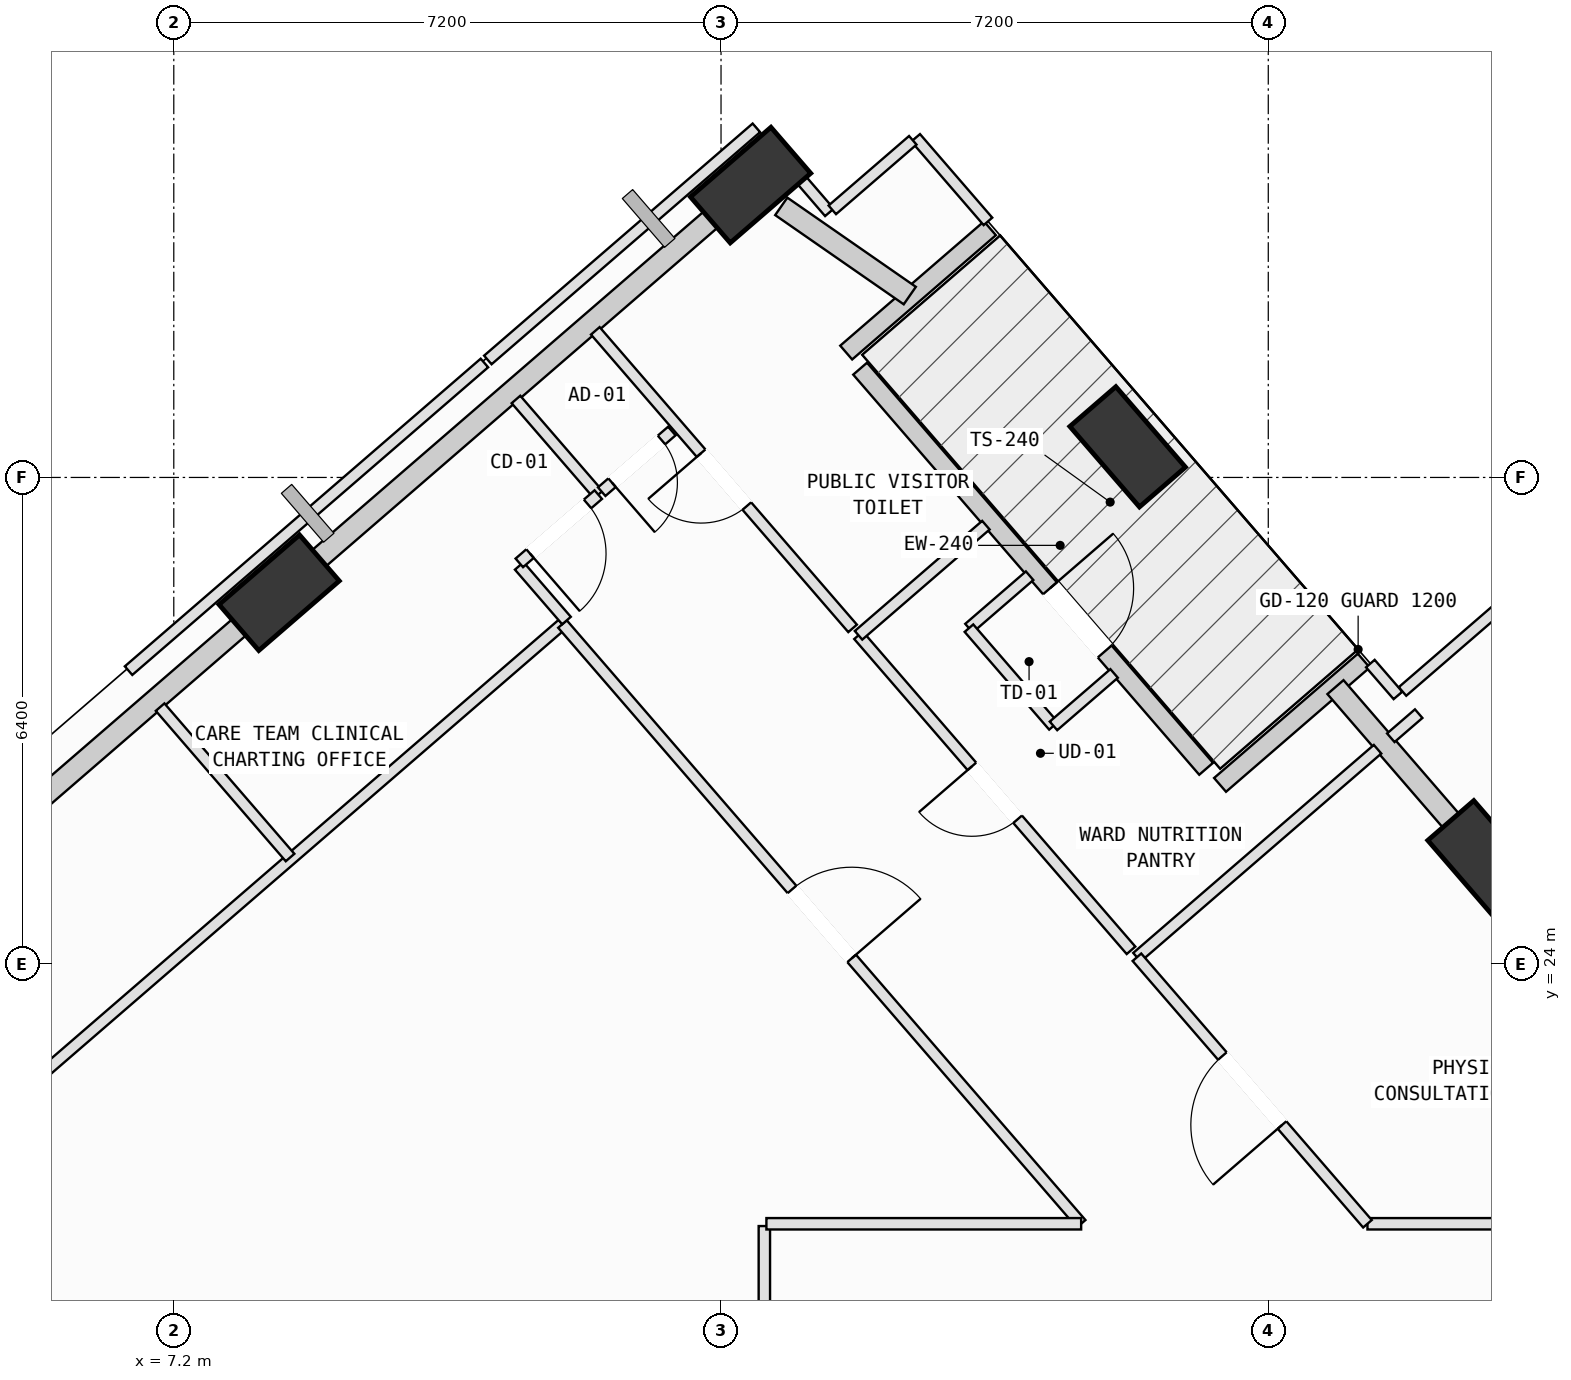
"""IFC4 building model, lengths in metres.
Left out: names, types, materials, properties, quantities, classifications, styles, units other than length and angle.
Written with IfcOpenShell. Run it as: python <this file> out.ifc"""

import sys

from ifc_helpers import new_model, si_unit, direction, frame, frame_2d, origin, origin_2d, place, context, subcontext, project, spatial, rectangle, extrude, element, fill, save


model = new_model("IFC4")
c1 = context("Model", 3, precision=1e-05, world=origin(), true_north=direction((0.0, 1.0)))
c2 = subcontext(c1, "Body", "Model", "MODEL_VIEW")
j1 = project(units=[si_unit("LENGTHUNIT", "METRE"), si_unit("PLANEANGLEUNIT", "RADIAN")], contexts=[c1])
p1 = place(None, origin())
s1 = spatial("IfcSite", under=j1, at=p1, CompositionType="ELEMENT")
p2 = place(p1, origin())
s2 = spatial("IfcBuilding", under=s1, at=p2, CompositionType="ELEMENT")
p3 = place(p2, frame((0.0, 0.0, 197.8)))
s3 = spatial("IfcBuildingStorey", under=s2, at=p3, CompositionType="ELEMENT", Elevation=197.8)
p4 = place(p3, frame((24.459, 25.357, 0.002), z_axis=(-0.001953505753, -0.03791022102, 0.999279239731), x_axis=(-0.614315591928, 0.788537788742, 0.028714268915)))
e1 = element("IfcColumn", 1, at=p4, inside=s3, PredefinedType="COLUMN", context=c2, shape_type="SweptSolid", body=[
    extrude(rectangle(XDim=1.4, YDim=0.8, at=origin_2d()), origin(), (0.0, 0.0, 1.0), 3.999),
])
p5 = place(p3, frame((19.75, 30.803, 0.002), z_axis=(-0.024327793483, -0.057496514422, 0.998049251938), x_axis=(-0.30819596819, 0.95015002601, 0.047224710319)))
e2 = element("IfcColumn", 2, at=p5, inside=s3, PredefinedType="COLUMN", context=c2, shape_type="SweptSolid", body=[
    extrude(rectangle(XDim=1.4, YDim=0.8, at=origin_2d()), origin(), (0.0, 0.0, 1.0), 4.004),
])
p6 = place(p3, frame((14.789, 34.247, 0.002), z_axis=(-0.038341673554, -0.078022262692, 0.996214054605), x_axis=(0.96626592112, 0.251190925626, 0.056862013376)))
e3 = element("IfcColumn", 3, at=p6, inside=s3, PredefinedType="COLUMN", context=c2, shape_type="SweptSolid", body=[
    extrude(rectangle(XDim=1.4, YDim=0.8, at=origin_2d()), origin(), (0.0, 0.0, 1.0), 4.011),
])
p7 = place(p3, frame((8.586, 28.884, 0.002), z_axis=(-0.015978962471, -0.103286069202, 0.994523333395), x_axis=(0.846984642611, 0.527203728551, 0.068361127714)))
e4 = element("IfcColumn", 4, at=p7, inside=s3, PredefinedType="COLUMN", context=c2, shape_type="SweptSolid", body=[
    extrude(rectangle(XDim=1.4, YDim=0.8, at=origin_2d()), origin(), (0.0, 0.0, 1.0), 4.018),
])
p8 = place(p3, frame((16.23, 31.831, 0.0), z_axis=(0.0, 0.0, 1.0), x_axis=(0.654092813451, -0.756414298775, 0.0)))
e5 = element("IfcWall", 5, at=p8, inside=s3, PredefinedType="SOLIDWALL", context=c2, shape_type="SweptSolid", body=[
    extrude(rectangle(XDim=6.96, YDim=0.24, at=frame_2d((3.48, 0.0))), origin(), (0.0, 0.0, 1.0), 3.265),
])
p9 = place(p8, frame((3.82, 0.0, 0.0)))
e6 = element("IfcOpeningElement", 6, at=p9, cuts=e5, PredefinedType="OPENING", context=c2, shape_type="SweptSolid", body=[
    extrude(rectangle(XDim=1.1, YDim=2.15, at=frame_2d((0.55, 1.075))), frame((0.0, 0.13, 0.0), z_axis=(0.0, -1.0, 0.0), x_axis=(1.0, 0.0, 0.0)), (0.0, 0.0, 1.0), 0.26),
])
for number, where, z_axis, x_axis in (
    (7, (20.966, 26.355, 0.0), (0.0, 0.0, 1.0), (0.756, 0.654, 0.0)),
    (8, (17.938, 33.678, 0.0), (0.0, 0.0, 1.0), (-0.756, -0.654, 0.0)),
):
    element("IfcWall", number, at=place(p3, frame(where, z_axis=z_axis, x_axis=x_axis)), inside=s3, PredefinedType="SOLIDWALL", context=c2, shape_type="SweptSolid", body=[
        extrude(rectangle(XDim=2.5, YDim=0.24, at=frame_2d((1.25, 0.0))), origin(), (0.0, 0.0, 1.0), 3.265),
    ])
p10 = place(p3, frame((24.172, 25.689, 0.0), z_axis=(0.0, 0.0, 1.0), x_axis=(-0.654087588851, 0.756418816603, 0.0)))
e9 = element("IfcWall", 9, at=p10, inside=s3, PredefinedType="SOLIDWALL", context=c2, shape_type="SweptSolid", body=[
    extrude(rectangle(XDim=2.582, YDim=0.28, at=frame_2d((1.291, 0.0))), origin(), (0.0, 0.0, 1.0), 3.245),
])
p11 = place(p3, frame((15.192, 33.967, 0.0), z_axis=(0.0, 0.0, 1.0), x_axis=(0.821504218331, -0.570202437092, 0.0)))
e10 = element("IfcWall", 10, at=p11, inside=s3, PredefinedType="SOLIDWALL", context=c2, shape_type="SweptSolid", body=[
    extrude(rectangle(XDim=2.059, YDim=0.28, at=frame_2d((1.029, 0.0))), origin(), (0.0, 0.0, 1.0), 3.245),
])
p12 = place(p3, frame((8.826, 29.091, 0.0), z_axis=(0.0, 0.0, 1.0), x_axis=(0.756422768402, 0.654083018769, 0.0)))
e11 = element("IfcWall", 11, at=p12, inside=s3, PredefinedType="SOLIDWALL", context=c2, shape_type="SweptSolid", body=[
    extrude(rectangle(XDim=7.231, YDim=0.28, at=frame_2d((3.615, 0.0))), origin(), (0.0, 0.0, 1.0), 3.265),
])
p13 = place(p3, frame((2.605, 23.712, 0.0), z_axis=(0.0, 0.0, 1.0), x_axis=(0.756416610338, 0.654090140275, 0.0)))
e12 = element("IfcWall", 12, at=p13, inside=s3, PredefinedType="SOLIDWALL", context=c2, shape_type="SweptSolid", body=[
    extrude(rectangle(XDim=7.27, YDim=0.28, at=frame_2d((3.635, 0.0))), origin(), (0.0, 0.0, 1.0), 3.265),
])
p14 = place(p3, frame((14.97, 20.55, 0.0), z_axis=(0.0, 0.0, 1.0), x_axis=(0.0, -1.0, 0.0)))
e13 = element("IfcWall", 13, at=p14, inside=s3, PredefinedType="PARTITIONING", context=c2, shape_type="SweptSolid", body=[
    extrude(rectangle(XDim=2.32, YDim=0.15, at=frame_2d((1.16, 0.0))), origin(), (0.0, 0.0, 1.0), 3.78),
])
p15 = place(p3, frame((2.82, 20.262, 0.0), z_axis=(0.0, 0.0, 1.0), x_axis=(0.756440163384, 0.654062901577, 0.0)))
e14 = element("IfcWall", 14, at=p15, inside=s3, PredefinedType="PARTITIONING", context=c2, shape_type="SweptSolid", body=[
    extrude(rectangle(XDim=12.551, YDim=0.15, at=frame_2d((6.275, 0.0))), origin(), (0.0, 0.0, 1.0), 3.78),
])
p16 = place(p3, frame((12.314, 28.471, 0.0), z_axis=(0.0, 0.0, 1.0), x_axis=(0.654121175756, -0.756389772159, 0.0)))
e15 = element("IfcWall", 15, at=p16, inside=s3, PredefinedType="PARTITIONING", context=c2, shape_type="SweptSolid", body=[
    extrude(rectangle(XDim=10.432, YDim=0.15, at=frame_2d((5.216, 0.0))), origin(), (0.0, 0.0, 1.0), 3.78),
])
p17 = place(p16, frame((4.616, 0.0, 0.0)))
e16 = element("IfcOpeningElement", 16, at=p17, cuts=e15, PredefinedType="OPENING", context=c2, shape_type="SweptSolid", body=[
    extrude(rectangle(XDim=1.2, YDim=2.15, at=frame_2d((0.6, 1.075))), frame((0.0, 0.085, 0.0), z_axis=(0.0, -1.0, 0.0), x_axis=(1.0, 0.0, 0.0)), (0.0, 0.0, 1.0), 0.17),
])
p18 = place(p3, frame((19.138, 20.58, 0.0), z_axis=(0.0, 0.0, 1.0), x_axis=(-1.0, 0.0, 0.0)))
e17 = element("IfcWall", 17, at=p18, inside=s3, PredefinedType="PARTITIONING", context=c2, shape_type="SweptSolid", body=[
    extrude(rectangle(XDim=4.141, YDim=0.15, at=frame_2d((2.07, 0.0))), origin(), (0.0, 0.0, 1.0), 3.78),
])
p19 = place(p3, frame((19.872, 24.087, 0.0), z_axis=(0.0, 0.0, 1.0), x_axis=(0.756494990974, 0.653999486721, 0.0)))
e18 = element("IfcWall", 18, at=p19, inside=s3, PredefinedType="PARTITIONING", context=c2, shape_type="SweptSolid", body=[
    extrude(rectangle(XDim=4.185, YDim=0.15, at=frame_2d((2.093, 0.0))), origin(), (0.0, 0.0, 1.0), 3.78),
])
p20 = place(p3, frame((23.212, 26.975, 0.0), z_axis=(0.0, 0.0, 1.0), x_axis=(0.75704932423, 0.653357727959, 0.0)))
e19 = element("IfcWall", 19, at=p20, inside=s3, PredefinedType="PARTITIONING", context=c2, shape_type="SweptSolid", body=[
    extrude(rectangle(XDim=0.485, YDim=0.15, at=frame_2d((0.243, 0.0))), origin(), (0.0, 0.0, 1.0), 3.78),
])
p21 = place(p3, frame((25.264, 20.58, 0.0), z_axis=(0.0, 0.0, 1.0), x_axis=(-1.0, 0.0, 0.0)))
e20 = element("IfcWall", 20, at=p21, inside=s3, PredefinedType="PARTITIONING", context=c2, shape_type="SweptSolid", body=[
    extrude(rectangle(XDim=2.359, YDim=0.15, at=frame_2d((1.179, 0.0))), origin(), (0.0, 0.0, 1.0), 3.78),
])
p22 = place(p3, frame((22.905, 20.58, 0.0), z_axis=(0.0, 0.0, 1.0), x_axis=(-0.654154375425, 0.756361060018, 0.0)))
e21 = element("IfcWall", 21, at=p22, inside=s3, PredefinedType="PARTITIONING", context=c2, shape_type="SweptSolid", body=[
    extrude(rectangle(XDim=4.636, YDim=0.15, at=frame_2d((2.318, 0.0))), origin(), (0.0, 0.0, 1.0), 3.78),
])
p23 = place(p22, frame((1.718, 0.0, 0.0)))
e22 = element("IfcOpeningElement", 22, at=p23, cuts=e21, PredefinedType="OPENING", context=c2, shape_type="SweptSolid", body=[
    extrude(rectangle(XDim=1.2, YDim=2.15, at=frame_2d((0.6, 1.075))), frame((0.0, 0.085, 0.0), z_axis=(0.0, -1.0, 0.0), x_axis=(1.0, 0.0, 0.0)), (0.0, 0.0, 1.0), 0.17),
])
p24 = place(p3, frame((19.794, 24.178, 0.0), z_axis=(0.0, 0.0, 1.0), x_axis=(-0.6541601986, 0.756356023687, 0.0)))
e23 = element("IfcWall", 23, at=p24, inside=s3, PredefinedType="PARTITIONING", context=c2, shape_type="SweptSolid", body=[
    extrude(rectangle(XDim=5.48, YDim=0.15, at=frame_2d((2.74, 0.0))), origin(), (0.0, 0.0, 1.0), 3.78),
])
p25 = place(p24, frame((2.28, 0.0, 0.0)))
e24 = element("IfcOpeningElement", 24, at=p25, cuts=e23, PredefinedType="OPENING", context=c2, shape_type="SweptSolid", body=[
    extrude(rectangle(XDim=0.92, YDim=2.1, at=frame_2d((0.46, 1.05))), frame((0.0, 0.085, 0.0), z_axis=(0.0, -1.0, 0.0), x_axis=(1.0, 0.0, 0.0)), (0.0, 0.0, 1.0), 0.17),
])
p26 = place(p3, frame((16.209, 28.323, 0.0), z_axis=(0.0, 0.0, 1.0), x_axis=(0.756488411531, 0.654007097223, 0.0)))
e25 = element("IfcWall", 25, at=p26, inside=s3, PredefinedType="PARTITIONING", context=c2, shape_type="SweptSolid", body=[
    extrude(rectangle(XDim=2.216, YDim=0.15, at=frame_2d((1.108, 0.0))), origin(), (0.0, 0.0, 1.0), 3.78),
])
p27 = place(p3, frame((18.46, 29.107, 0.0), z_axis=(0.0, 0.0, 1.0), x_axis=(-0.756406502771, -0.654101828896, 0.0)))
e26 = element("IfcWall", 26, at=p27, inside=s3, PredefinedType="PARTITIONING", context=c2, shape_type="SweptSolid", body=[
    extrude(rectangle(XDim=1.055, YDim=0.15, at=frame_2d((0.527, 0.0))), origin(), (0.0, 0.0, 1.0), 3.78),
])
p28 = place(p3, frame((17.662, 28.417, 0.0), z_axis=(0.0, 0.0, 1.0), x_axis=(0.654049777845, -0.75645151074, 0.0)))
e27 = element("IfcWall", 27, at=p28, inside=s3, PredefinedType="PARTITIONING", context=c2, shape_type="SweptSolid", body=[
    extrude(rectangle(XDim=1.7, YDim=0.15, at=frame_2d((0.85, 0.0))), origin(), (0.0, 0.0, 1.0), 3.78),
])
p29 = place(p3, frame((18.774, 27.131, 0.0), z_axis=(0.0, 0.0, 1.0), x_axis=(0.756505506121, 0.653987323431, 0.0)))
e28 = element("IfcWall", 28, at=p29, inside=s3, PredefinedType="PARTITIONING", context=c2, shape_type="SweptSolid", body=[
    extrude(rectangle(XDim=1.055, YDim=0.15, at=frame_2d((0.527, 0.0))), origin(), (0.0, 0.0, 1.0), 3.78),
])
p30 = place(p3, frame((22.943, 27.951, 0.0), z_axis=(0.0, 0.0, 1.0), x_axis=(0.654628599647, -0.755950657466, 0.0)))
e29 = element("IfcWall", 29, at=p30, inside=s3, PredefinedType="PARTITIONING", context=c2, shape_type="SweptSolid", body=[
    extrude(rectangle(XDim=0.554, YDim=0.15, at=frame_2d((0.277, 0.0))), origin(), (0.0, 0.0, 1.0), 3.78),
])
p31 = place(p3, frame((16.961, 34.869, 0.0), z_axis=(0.0, 0.0, 1.0), x_axis=(0.654131164674, -0.75638113369, 0.0)))
e30 = element("IfcWall", 30, at=p31, inside=s3, PredefinedType="PARTITIONING", context=c2, shape_type="SweptSolid", body=[
    extrude(rectangle(XDim=1.454, YDim=0.15, at=frame_2d((0.727, 0.0))), origin(), (0.0, 0.0, 1.0), 3.78),
])
p32 = place(p3, frame((16.131, 28.414, 0.0), z_axis=(0.0, 0.0, 1.0), x_axis=(-0.654044709292, 0.756455893127, 0.0)))
e31 = element("IfcWall", 31, at=p32, inside=s3, PredefinedType="PARTITIONING", context=c2, shape_type="SweptSolid", body=[
    extrude(rectangle(XDim=5.176, YDim=0.15, at=frame_2d((2.588, 0.0))), origin(), (0.0, 0.0, 1.0), 3.78),
])
p33 = place(p32, frame((2.128, 0.0, 0.0)))
e32 = element("IfcOpeningElement", 32, at=p33, cuts=e31, PredefinedType="OPENING", context=c2, shape_type="SweptSolid", body=[
    extrude(rectangle(XDim=0.92, YDim=2.1, at=frame_2d((0.46, 1.05))), frame((0.0, 0.085, 0.0), z_axis=(0.0, -1.0, 0.0), x_axis=(1.0, 0.0, 0.0)), (0.0, 0.0, 1.0), 0.17),
])
p34 = place(p3, frame((14.171, 33.964, 0.0), z_axis=(0.0, 0.0, 1.0), x_axis=(0.756485267344, 0.65401073408, 0.0)))
e33 = element("IfcWall", 33, at=p34, inside=s3, PredefinedType="PARTITIONING", context=c2, shape_type="SweptSolid", body=[
    extrude(rectangle(XDim=1.203, YDim=0.15, at=frame_2d((0.602, 0.0))), origin(), (0.0, 0.0, 1.0), 3.265),
])
p35 = place(p3, frame((15.114, 34.713, 0.0), z_axis=(0.0, 0.0, 1.0), x_axis=(0.653333992429, -0.7570698081, 0.0)))
e34 = element("IfcWall", 34, at=p35, inside=s3, PredefinedType="PARTITIONING", context=c2, shape_type="SweptSolid", body=[
    extrude(rectangle(XDim=1.09, YDim=0.15, at=frame_2d((0.545, 0.0))), origin(), (0.0, 0.0, 1.0), 3.78),
])
p36 = place(p3, frame((15.864, 33.921, 0.0), z_axis=(0.0, 0.0, 1.0), x_axis=(0.756689638631, 0.653774265927, 0.0)))
e35 = element("IfcWall", 35, at=p36, inside=s3, PredefinedType="PARTITIONING", context=c2, shape_type="SweptSolid", body=[
    extrude(rectangle(XDim=1.4, YDim=0.15, at=frame_2d((0.7, 0.0))), origin(), (0.0, 0.0, 1.0), 3.78),
])
p37 = place(p3, frame((11.745, 29.236, 0.0), z_axis=(0.0, 0.0, 1.0), x_axis=(0.654147961866, -0.756366606869, 0.0)))
e36 = element("IfcWall", 36, at=p37, inside=s3, PredefinedType="PARTITIONING", context=c2, shape_type="SweptSolid", body=[
    extrude(rectangle(XDim=0.951, YDim=0.15, at=frame_2d((0.475, 0.0))), origin(), (0.0, 0.0, 1.0), 3.78),
])
p38 = place(p3, frame((8.73, 25.399, 0.0), z_axis=(0.0, 0.0, 1.0), x_axis=(-0.653799696022, 0.75666766647, 0.0)))
e37 = element("IfcWall", 37, at=p38, inside=s3, PredefinedType="PARTITIONING", context=c2, shape_type="SweptSolid", body=[
    extrude(rectangle(XDim=2.615, YDim=0.15, at=frame_2d((1.308, 0.0))), origin(), (0.0, 0.0, 1.0), 3.78),
])
p39 = place(p3, frame((6.605, 27.858, 0.0), z_axis=(0.0, 0.0, 1.0), x_axis=(0.75646812848, 0.654030557844, 0.0)))
e38 = element("IfcWall", 38, at=p39, inside=s3, PredefinedType="PARTITIONING", context=c2, shape_type="SweptSolid", body=[
    extrude(rectangle(XDim=6.189, YDim=0.15, at=frame_2d((3.095, 0.0))), origin(), (0.0, 0.0, 1.0), 3.78),
])
p40 = place(p3, frame((11.702, 31.426, 0.0), z_axis=(0.0, 0.0, 1.0), x_axis=(0.654234021509, -0.756292169138, 0.0)))
e39 = element("IfcWall", 39, at=p40, inside=s3, PredefinedType="PARTITIONING", context=c2, shape_type="SweptSolid", body=[
    extrude(rectangle(XDim=1.655, YDim=0.15, at=frame_2d((0.828, 0.0))), origin(), (0.0, 0.0, 1.0), 3.78),
])
p41 = place(p3, frame((12.785, 30.174, 0.0), z_axis=(0.0, 0.0, 1.0), x_axis=(-0.756451126646, -0.654050222075, 0.0)))
e40 = element("IfcWall", 40, at=p41, inside=s3, PredefinedType="PARTITIONING", context=c2, shape_type="SweptSolid", body=[
    extrude(rectangle(XDim=1.373, YDim=0.15, at=frame_2d((0.687, 0.0))), origin(), (0.0, 0.0, 1.0), 3.78),
])
p42 = place(p41, frame((0.187, 0.0, 0.0)))
e41 = element("IfcOpeningElement", 41, at=p42, cuts=e40, PredefinedType="OPENING", context=c2, shape_type="SweptSolid", body=[
    extrude(rectangle(XDim=1.0, YDim=2.12, at=frame_2d((0.5, 1.06))), frame((0.0, 0.085, 0.0), z_axis=(0.0, -1.0, 0.0), x_axis=(1.0, 0.0, 0.0)), (0.0, 0.0, 1.0), 0.17),
])
p43 = place(p3, frame((13.753, 31.011, 0.0), z_axis=(0.0, 0.0, 1.0), x_axis=(-0.75638190287, -0.65413027526, 0.0)))
e42 = element("IfcWall", 42, at=p43, inside=s3, PredefinedType="PARTITIONING", context=c2, shape_type="SweptSolid", body=[
    extrude(rectangle(XDim=1.22, YDim=0.15, at=frame_2d((0.61, 0.0))), origin(), (0.0, 0.0, 1.0), 3.78),
])
p44 = place(p43, frame((0.18, 0.0, 0.0)))
e43 = element("IfcOpeningElement", 43, at=p44, cuts=e42, PredefinedType="OPENING", context=c2, shape_type="SweptSolid", body=[
    extrude(rectangle(XDim=0.86, YDim=2.06, at=frame_2d((0.43, 1.03))), frame((0.0, 0.085, 0.0), z_axis=(0.0, -1.0, 0.0), x_axis=(1.0, 0.0, 0.0)), (0.0, 0.0, 1.0), 0.17),
])
p45 = place(p3, frame((11.332, 31.946, 0.0), z_axis=(0.0, 0.0, 1.0), x_axis=(0.756530231034, 0.653958721581, 0.0)))
e44 = element("IfcWall", 44, at=p45, inside=s3, PredefinedType="PARTITIONING", context=c2, shape_type="SweptSolid", body=[
    extrude(rectangle(XDim=4.67, YDim=0.15, at=frame_2d((2.335, 0.0))), origin(), (0.0, 0.0, 1.0), 3.78),
])
p46 = place(p3, frame((23.366, 27.584, 0.0), z_axis=(0.0, 0.0, 1.0), x_axis=(0.756429371743, 0.654075382173, 0.0)))
e45 = element("IfcWall", 45, at=p46, inside=s3, PredefinedType="PARTITIONING", context=c2, shape_type="SweptSolid", body=[
    extrude(rectangle(XDim=2.121, YDim=0.15, at=frame_2d((1.06, 0.0))), origin(), (0.0, 0.0, 1.0), 3.78),
])
p47 = place(p9, origin())
e46 = element("IfcDoor", 46, at=p47, inside=s3, OperationType="SINGLE_SWING_LEFT", PredefinedType="DOOR", context=c2, shape_type="SweptSolid", body=[
    extrude(rectangle(XDim=1.1, YDim=2.15, at=frame_2d((0.55, 1.075))), frame((0.0, 0.025, 0.0), z_axis=(0.0, -1.0, 0.0), x_axis=(1.0, 0.0, 0.0)), (0.0, 0.0, 1.0), 0.05),
])
fill(e6, e46)
p48 = place(p17, origin())
e47 = element("IfcDoor", 47, at=p48, inside=s3, OperationType="SINGLE_SWING_RIGHT", PredefinedType="DOOR", context=c2, shape_type="SweptSolid", body=[
    extrude(rectangle(XDim=1.2, YDim=2.15, at=frame_2d((0.6, 1.075))), frame((0.0, 0.025, 0.0), z_axis=(0.0, -1.0, 0.0), x_axis=(1.0, 0.0, 0.0)), (0.0, 0.0, 1.0), 0.05),
])
fill(e16, e47)
p49 = place(p23, origin())
e48 = element("IfcDoor", 48, at=p49, inside=s3, OperationType="SINGLE_SWING_LEFT", PredefinedType="DOOR", context=c2, shape_type="SweptSolid", body=[
    extrude(rectangle(XDim=1.2, YDim=2.15, at=frame_2d((0.6, 1.075))), frame((0.0, 0.025, 0.0), z_axis=(0.0, -1.0, 0.0), x_axis=(1.0, 0.0, 0.0)), (0.0, 0.0, 1.0), 0.05),
])
fill(e22, e48)
p50 = place(p25, origin())
e49 = element("IfcDoor", 49, at=p50, inside=s3, OperationType="SINGLE_SWING_RIGHT", PredefinedType="DOOR", context=c2, shape_type="SweptSolid", body=[
    extrude(rectangle(XDim=0.92, YDim=2.1, at=frame_2d((0.46, 1.05))), frame((0.0, 0.025, 0.0), z_axis=(0.0, -1.0, 0.0), x_axis=(1.0, 0.0, 0.0)), (0.0, 0.0, 1.0), 0.05),
])
fill(e24, e49)
p51 = place(p33, origin())
e50 = element("IfcDoor", 50, at=p51, inside=s3, OperationType="SINGLE_SWING_RIGHT", PredefinedType="DOOR", context=c2, shape_type="SweptSolid", body=[
    extrude(rectangle(XDim=0.92, YDim=2.1, at=frame_2d((0.46, 1.05))), frame((0.0, 0.025, 0.0), z_axis=(0.0, -1.0, 0.0), x_axis=(1.0, 0.0, 0.0)), (0.0, 0.0, 1.0), 0.05),
])
fill(e32, e50)
p52 = place(p42, origin())
e51 = element("IfcDoor", 51, at=p52, inside=s3, OperationType="SINGLE_SWING_RIGHT", PredefinedType="DOOR", context=c2, shape_type="SweptSolid", body=[
    extrude(rectangle(XDim=1.0, YDim=2.12, at=frame_2d((0.5, 1.06))), frame((0.0, 0.025, 0.0), z_axis=(0.0, -1.0, 0.0), x_axis=(1.0, 0.0, 0.0)), (0.0, 0.0, 1.0), 0.05),
])
fill(e41, e51)
p53 = place(p44, origin())
e52 = element("IfcDoor", 52, at=p53, inside=s3, OperationType="SINGLE_SWING_RIGHT", PredefinedType="DOOR", context=c2, shape_type="SweptSolid", body=[
    extrude(rectangle(XDim=0.86, YDim=2.06, at=frame_2d((0.43, 1.03))), frame((0.0, 0.025, 0.0), z_axis=(0.0, -1.0, 0.0), x_axis=(1.0, 0.0, 0.0)), (0.0, 0.0, 1.0), 0.05),
])
fill(e43, e52)
save(model, sys.argv[1])
